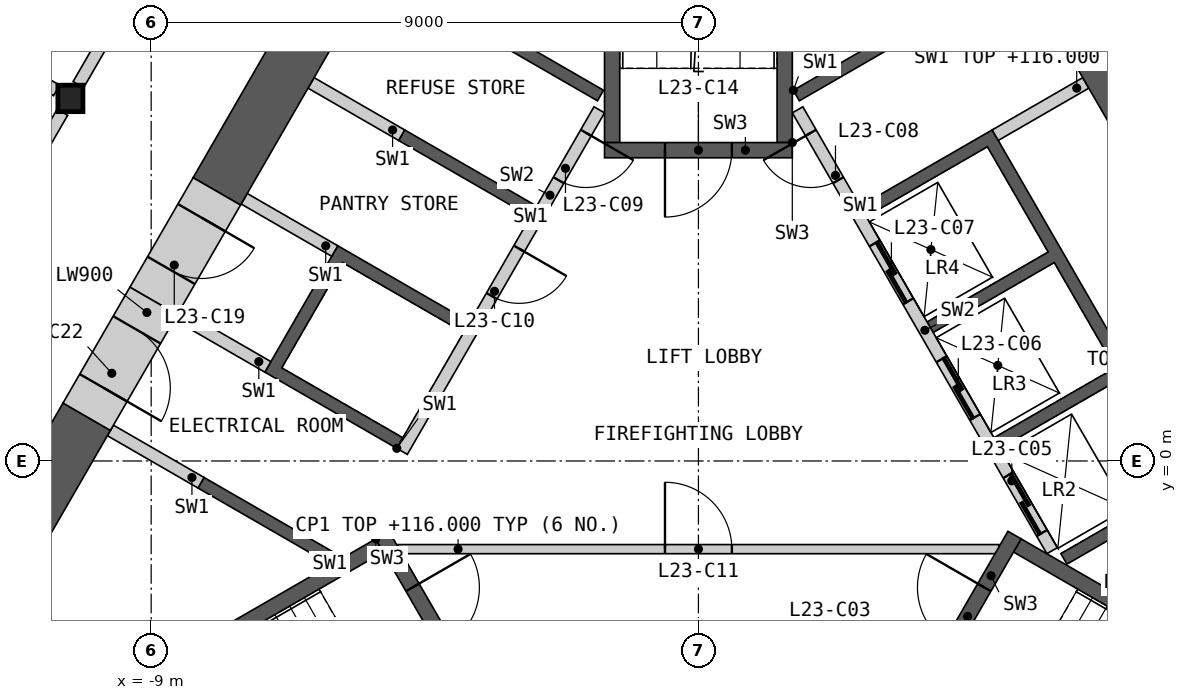
"""IFC4 building model, lengths in metres.
Left out: names, types, materials, properties, quantities, classifications, styles, units other than length and angle.
Written with IfcOpenShell. Run it as: python <this file> out.ifc"""

import sys

from ifc_helpers import new_model, si_unit, direction, frame, frame_2d, origin, origin_2d, place, context, subcontext, project, spatial, polyline, rectangle, i_section, outline, extrude, element, fill, save


model = new_model("IFC4")
c1 = context("Model", 3, precision=1e-05, world=origin(), true_north=direction((0.0, 1.0)))
c2 = subcontext(c1, "Body", "Model", "MODEL_VIEW")
j1 = project(units=[si_unit("LENGTHUNIT", "METRE"), si_unit("PLANEANGLEUNIT", "RADIAN")], contexts=[c1])
p1 = place(None, origin())
s1 = spatial("IfcSite", under=j1, at=p1, CompositionType="ELEMENT")
p2 = place(p1, origin())
s2 = spatial("IfcBuilding", under=s1, at=p2, CompositionType="ELEMENT")
p3 = place(p2, frame((0.0, 0.0, 112.2)))
s3 = spatial("IfcBuildingStorey", under=s2, at=p3, CompositionType="ELEMENT", Elevation=112.2)
p4 = place(p3, frame((-10.328, 5.963, 0.0), z_axis=(0.0, 0.0, 1.0), x_axis=(1.0, 0.0, 0.0)))
e1 = element("IfcColumn", 1, at=p4, inside=s3, PredefinedType="COLUMN", context=c2, shape_type="SweptSolid", body=[
    extrude(i_section(OverallWidth=0.412, OverallDepth=0.435, WebThickness=0.036, FlangeThickness=0.057, at=origin_2d()), origin(), (0.0, 0.0, 1.0), 4.2),
])
p5 = place(p3, origin())
e2 = element("IfcWall", 2, at=p5, inside=s3, PredefinedType="SHEAR", context=c2, shape_type="SweptSolid", body=[
    extrude(outline(polyline([(1.561, 6.097), (3.731, 7.35), (3.831, 7.177), (1.66, 5.924), (1.561, 6.097)])), origin(), (0.0, 0.0, 1.0), 3.8),
])
p6 = place(p3, origin())
e3 = element("IfcWall", 3, at=p6, inside=s3, PredefinedType="SHEAR", context=c2, shape_type="SweptSolid", body=[
    extrude(outline(polyline([(2.66, 4.192), (4.831, 5.445), (8.231, -0.444), (6.061, -1.697), (5.96, -1.524), (7.952, -0.374), (6.952, 1.358), (4.96, 0.208), (4.861, 0.381), (6.852, 1.531), (5.852, 3.263), (3.861, 2.113), (3.76, 2.287), (5.752, 3.437), (4.752, 5.169), (2.76, 4.019), (2.66, 4.192)])), origin(), (0.0, 0.0, 1.0), 3.8),
])
p7 = place(p3, frame((5.817, -1.476, 0.0), z_axis=(0.0, 0.0, 1.0), x_axis=(-0.500002616675, 0.866023893041, 0.0)))
e4 = element("IfcWall", 4, at=p7, inside=s3, PredefinedType="SOLIDWALL", context=c2, shape_type="SweptSolid", body=[
    extrude(rectangle(XDim=8.373, YDim=0.2, at=frame_2d((4.187, 0.0))), origin(), (0.0, 0.0, 1.0), 3.8),
])
p8 = place(p7, frame((0.337, 0.0, 0.0)))
e5 = element("IfcOpeningElement", 5, at=p8, cuts=e4, PredefinedType="OPENING", context=c2, shape_type="SweptSolid", body=[
    extrude(rectangle(XDim=1.1, YDim=2.1, at=frame_2d((0.55, 1.05))), frame((0.0, 0.11, 0.0), z_axis=(0.0, -1.0, 0.0), x_axis=(1.0, 0.0, 0.0)), (0.0, 0.0, 1.0), 0.22),
])
p9 = place(p7, frame((2.537, 0.0, 0.0)))
e6 = element("IfcOpeningElement", 6, at=p9, cuts=e4, PredefinedType="OPENING", context=c2, shape_type="SweptSolid", body=[
    extrude(rectangle(XDim=1.1, YDim=2.1, at=frame_2d((0.55, 1.05))), frame((0.0, 0.11, 0.0), z_axis=(0.0, -1.0, 0.0), x_axis=(1.0, 0.0, 0.0)), (0.0, 0.0, 1.0), 0.22),
])
p10 = place(p7, frame((4.737, 0.0, 0.0)))
e7 = element("IfcOpeningElement", 7, at=p10, cuts=e4, PredefinedType="OPENING", context=c2, shape_type="SweptSolid", body=[
    extrude(rectangle(XDim=1.1, YDim=2.1, at=frame_2d((0.55, 1.05))), frame((0.0, 0.11, 0.0), z_axis=(0.0, -1.0, 0.0), x_axis=(1.0, 0.0, 0.0)), (0.0, 0.0, 1.0), 0.22),
])
p11 = place(p7, frame((7.037, 0.0, 0.0)))
e8 = element("IfcOpeningElement", 8, at=p11, cuts=e4, PredefinedType="OPENING", context=c2, shape_type="SweptSolid", body=[
    extrude(rectangle(XDim=0.9, YDim=2.1, at=frame_2d((0.45, 1.05))), frame((0.0, 0.11, 0.0), z_axis=(0.0, -1.0, 0.0), x_axis=(1.0, 0.0, 0.0)), (0.0, 0.0, 1.0), 0.22),
])
p12 = place(p3, frame((4.881, 5.358, 0.0), z_axis=(0.0, 0.0, 1.0), x_axis=(0.866024871741, 0.500000921525, 0.0)))
e9 = element("IfcWall", 9, at=p12, inside=s3, PredefinedType="SHEAR", context=c2, shape_type="SweptSolid", body=[
    extrude(rectangle(XDim=1.72, YDim=0.2, at=frame_2d((0.86, 0.0))), origin(), (0.0, 0.0, 1.0), 3.8),
])
p13 = place(p3, origin())
e10 = element("IfcWall", 10, at=p13, inside=s3, PredefinedType="SHEAR", context=c2, shape_type="SweptSolid", body=[
    extrude(outline(polyline([(-6.061, -1.697), (-8.231, -0.444), (-8.131, -0.271), (-5.96, -1.524), (-6.061, -1.697)])), origin(), (0.0, 0.0, 1.0), 3.8),
])
p14 = place(p3, origin())
e11 = element("IfcWall", 11, at=p14, inside=s3, PredefinedType="SHEAR", context=c2, shape_type="SweptSolid", body=[
    extrude(outline(polyline([(-4.96, 0.208), (-7.131, 1.461), (-5.931, 3.54), (-3.76, 2.287), (-3.861, 2.113), (-5.852, 3.263), (-6.852, 1.531), (-4.861, 0.381), (-4.96, 0.208)])), origin(), (0.0, 0.0, 1.0), 3.8),
])
p15 = place(p3, origin())
e12 = element("IfcWall", 12, at=p15, inside=s3, PredefinedType="SHEAR", context=c2, shape_type="SweptSolid", body=[
    extrude(outline(polyline([(-2.76, 4.019), (-4.931, 5.272), (-4.831, 5.445), (-2.66, 4.192), (-2.76, 4.019)])), origin(), (0.0, 0.0, 1.0), 3.8),
])
p16 = place(p3, origin())
e13 = element("IfcWall", 13, at=p16, inside=s3, PredefinedType="SHEAR", context=c2, shape_type="SweptSolid", body=[
    extrude(outline(polyline([(-3.731, 7.35), (-1.561, 6.097), (-1.66, 5.924), (-3.831, 7.177), (-3.731, 7.35)])), origin(), (0.0, 0.0, 1.0), 3.8),
])
p17 = place(p3, frame((-1.631, 5.776, 0.0), z_axis=(0.0, 0.0, 1.0), x_axis=(-0.499992876559, -0.866029516466, 0.0)))
e14 = element("IfcWall", 14, at=p17, inside=s3, PredefinedType="SOLIDWALL", context=c2, shape_type="SweptSolid", body=[
    extrude(rectangle(XDim=6.486, YDim=0.2, at=frame_2d((3.243, 0.0))), origin(), (0.0, 0.0, 1.0), 3.8),
])
p18 = place(p17, frame((0.437, 0.0, 0.0)))
e15 = element("IfcOpeningElement", 15, at=p18, cuts=e14, PredefinedType="OPENING", context=c2, shape_type="SweptSolid", body=[
    extrude(rectangle(XDim=0.9, YDim=2.1, at=frame_2d((0.45, 1.05))), frame((0.0, 0.11, 0.0), z_axis=(0.0, -1.0, 0.0), x_axis=(1.0, 0.0, 0.0)), (0.0, 0.0, 1.0), 0.22),
])
p19 = place(p17, frame((2.637, 0.0, 0.0)))
e16 = element("IfcOpeningElement", 16, at=p19, cuts=e14, PredefinedType="OPENING", context=c2, shape_type="SweptSolid", body=[
    extrude(rectangle(XDim=0.9, YDim=2.1, at=frame_2d((0.45, 1.05))), frame((0.0, 0.11, 0.0), z_axis=(0.0, -1.0, 0.0), x_axis=(1.0, 0.0, 0.0)), (0.0, 0.0, 1.0), 0.22),
])
p20 = place(p3, frame((-4.881, 5.358, 0.0), z_axis=(0.0, 0.0, 1.0), x_axis=(-0.866024871741, 0.500000921525, 0.0)))
e17 = element("IfcWall", 17, at=p20, inside=s3, PredefinedType="SHEAR", context=c2, shape_type="SweptSolid", body=[
    extrude(rectangle(XDim=1.72, YDim=0.2, at=frame_2d((0.86, 0.0))), origin(), (0.0, 0.0, 1.0), 3.8),
])
p21 = place(p3, frame((-5.981, 3.453, 0.0), z_axis=(0.0, 0.0, 1.0), x_axis=(-0.866060346521, 0.499939472521, 0.0)))
e18 = element("IfcWall", 18, at=p21, inside=s3, PredefinedType="SHEAR", context=c2, shape_type="SweptSolid", body=[
    extrude(rectangle(XDim=1.72, YDim=0.2, at=frame_2d((0.86, 0.0))), origin(), (0.0, 0.0, 1.0), 3.8),
])
for number, where, z_axis, x_axis in (
    (19, (-7.081, 1.548, 0.0), (0.0, 0.0, 1.0), (-0.866, 0.5, 0.0)),
    (20, (-8.181, -0.357, 0.0), (0.0, 0.0, 1.0), (-0.866, 0.5, 0.0)),
):
    element("IfcWall", number, at=place(p3, frame(where, z_axis=z_axis, x_axis=x_axis)), inside=s3, PredefinedType="SHEAR", context=c2, shape_type="SweptSolid", body=[
        extrude(rectangle(XDim=1.72, YDim=0.2, at=frame_2d((0.86, 0.0))), origin(), (0.0, 0.0, 1.0), 3.8),
    ])
p22 = place(p3, frame((-4.941, -1.45, 0.0), z_axis=(0.0, 0.0, 1.0), x_axis=(1.0, 0.0, 0.0)))
e21 = element("IfcWall", 21, at=p22, inside=s3, PredefinedType="PARTITIONING", context=c2, shape_type="SweptSolid", body=[
    extrude(rectangle(XDim=9.882, YDim=0.15, at=frame_2d((4.941, 0.0))), origin(), (0.0, 0.0, 1.0), 3.8),
])
p23 = place(p22, frame((4.391, 0.0, 0.0)))
e22 = element("IfcOpeningElement", 22, at=p23, cuts=e21, PredefinedType="OPENING", context=c2, shape_type="SweptSolid", body=[
    extrude(rectangle(XDim=1.1, YDim=2.1, at=frame_2d((0.55, 1.05))), frame((0.0, 0.085, 0.0), z_axis=(0.0, -1.0, 0.0), x_axis=(1.0, 0.0, 0.0)), (0.0, 0.0, 1.0), 0.17),
])
p24 = place(p3, origin())
e23 = element("IfcWall", 23, at=p24, inside=s3, PredefinedType="SHEAR", context=c2, shape_type="SweptSolid", body=[
    extrude(outline(polyline([(-5.307, -1.281), (-10.374, -4.206), (-10.032, -4.298), (-5.182, -1.498), (-5.307, -1.281)])), origin(), (0.0, 0.0, 1.0), 3.8),
])
p25 = place(p3, frame((-5.199, -1.219, 0.0), z_axis=(0.0, 0.0, 1.0), x_axis=(0.499982516597, -0.866035497597, 0.0)))
e24 = element("IfcWall", 24, at=p25, inside=s3, PredefinedType="SHEAR", context=c2, shape_type="SweptSolid", body=[
    extrude(rectangle(XDim=3.088, YDim=0.25, at=frame_2d((1.544, 0.0))), origin(), (0.0, 0.0, 1.0), 3.8),
])
p26 = place(p25, frame((0.994, 0.0, 0.0)))
e25 = element("IfcOpeningElement", 25, at=p26, cuts=e24, PredefinedType="OPENING", context=c2, shape_type="SweptSolid", body=[
    extrude(rectangle(XDim=1.1, YDim=2.1, at=frame_2d((0.55, 1.05))), frame((0.0, 0.135, 0.0), z_axis=(0.0, -1.0, 0.0), x_axis=(1.0, 0.0, 0.0)), (0.0, 0.0, 1.0), 0.27),
])
p27 = place(p3, origin())
e26 = element("IfcWall", 26, at=p27, inside=s3, PredefinedType="SHEAR", context=c2, shape_type="SweptSolid", body=[
    extrude(outline(polyline([(10.032, -4.298), (10.374, -4.206), (5.307, -1.281), (5.182, -1.498), (10.032, -4.298)])), origin(), (0.0, 0.0, 1.0), 3.8),
])
p28 = place(p3, frame((3.655, -3.893, 0.0), z_axis=(0.0, 0.0, 1.0), x_axis=(0.499982516597, 0.866035497597, 0.0)))
e27 = element("IfcWall", 27, at=p28, inside=s3, PredefinedType="SHEAR", context=c2, shape_type="SweptSolid", body=[
    extrude(rectangle(XDim=3.088, YDim=0.25, at=frame_2d((1.544, 0.0))), origin(), (0.0, 0.0, 1.0), 3.8),
])
p29 = place(p28, frame((0.994, 0.0, 0.0)))
e28 = element("IfcOpeningElement", 28, at=p29, cuts=e27, PredefinedType="OPENING", context=c2, shape_type="SweptSolid", body=[
    extrude(rectangle(XDim=1.1, YDim=2.1, at=frame_2d((0.55, 1.05))), frame((0.0, 0.135, 0.0), z_axis=(0.0, -1.0, 0.0), x_axis=(1.0, 0.0, 0.0)), (0.0, 0.0, 1.0), 0.27),
])
p30 = place(p3, origin())
e29 = element("IfcWall", 29, at=p30, inside=s3, PredefinedType="SHEAR", context=c2, shape_type="SweptSolid", body=[
    extrude(outline(polyline([(1.544, 5.237), (1.544, 11.087), (1.294, 10.837), (1.294, 5.237), (1.544, 5.237)])), origin(), (0.0, 0.0, 1.0), 3.8),
])
p31 = place(p3, origin())
e30 = element("IfcWall", 30, at=p31, inside=s3, PredefinedType="SHEAR", context=c2, shape_type="SweptSolid", body=[
    extrude(outline(polyline([(-1.294, 10.837), (-1.544, 11.087), (-1.544, 5.237), (-1.294, 5.237), (-1.294, 10.837)])), origin(), (0.0, 0.0, 1.0), 3.8),
])
p32 = place(p3, frame((1.544, 5.112, 0.0), z_axis=(0.0, 0.0, 1.0), x_axis=(-1.0, 0.0, 0.0)))
e31 = element("IfcWall", 31, at=p32, inside=s3, PredefinedType="SHEAR", context=c2, shape_type="SweptSolid", body=[
    extrude(rectangle(XDim=3.088, YDim=0.25, at=frame_2d((1.544, 0.0))), origin(), (0.0, 0.0, 1.0), 3.8),
])
p33 = place(p32, frame((0.994, 0.0, 0.0)))
e32 = element("IfcOpeningElement", 32, at=p33, cuts=e31, PredefinedType="OPENING", context=c2, shape_type="SweptSolid", body=[
    extrude(rectangle(XDim=1.1, YDim=2.1, at=frame_2d((0.55, 1.05))), frame((0.0, 0.135, 0.0), z_axis=(0.0, -1.0, 0.0), x_axis=(1.0, 0.0, 0.0)), (0.0, 0.0, 1.0), 0.27),
])
p34 = place(p3, frame((7.91, 4.451, 0.0), z_axis=(0.0, 0.0, 1.0), x_axis=(-0.500005799286, 0.866022055539, 0.0)))
e33 = element("IfcWall", 33, at=p34, inside=s3, PredefinedType="SHEAR", context=c2, shape_type="SweptSolid", body=[
    extrude(rectangle(XDim=15.041, YDim=0.9, at=frame_2d((7.521, 0.0))), origin(), (0.0, 0.0, 1.0), 3.8),
])
p35 = place(p3, frame((-3.55, 12.004, 0.0), z_axis=(0.0, 0.0, 1.0), x_axis=(-0.499993245289, -0.866029303583, 0.0)))
e34 = element("IfcWall", 34, at=p35, inside=s3, PredefinedType="SHEAR", context=c2, shape_type="SweptSolid", body=[
    extrude(rectangle(XDim=8.741, YDim=0.9, at=frame_2d((4.37, 0.0))), origin(), (0.0, 0.0, 1.0), 3.8),
])
p36 = place(p3, frame((-10.06, 0.728, 0.0), z_axis=(0.0, 0.0, 1.0), x_axis=(-0.500021220092, -0.866013152012, 0.0)))
e35 = element("IfcWall", 35, at=p36, inside=s3, PredefinedType="SHEAR", context=c2, shape_type="SweptSolid", body=[
    extrude(rectangle(XDim=4.22, YDim=0.9, at=frame_2d((2.11, 0.0))), origin(), (0.0, 0.0, 1.0), 3.8),
])
p37 = place(p3, frame((-7.92, 4.434, 0.0), z_axis=(0.0, 0.0, 1.0), x_axis=(-0.499939227269, -0.866060488094, 0.0)))
e36 = element("IfcWall", 36, at=p37, inside=s3, PredefinedType="SHEAR", context=c2, shape_type="SweptSolid", body=[
    extrude(rectangle(XDim=2.08, YDim=0.9, at=frame_2d((1.04, 0.0))), origin(), (0.0, 0.0, 1.0), 3.8),
])
p38 = place(p37, frame((0.5, 0.0, 0.0)))
e37 = element("IfcOpeningElement", 37, at=p38, cuts=e36, PredefinedType="OPENING", context=c2, shape_type="SweptSolid", body=[
    extrude(rectangle(XDim=1.0, YDim=2.1, at=frame_2d((0.5, 1.05))), frame((0.0, 0.46, 0.0), z_axis=(0.0, -1.0, 0.0), x_axis=(1.0, 0.0, 0.0)), (0.0, 0.0, 1.0), 0.92),
])
p39 = place(p3, frame((-8.96, 2.633, 0.0), z_axis=(0.0, 0.0, 1.0), x_axis=(-0.50002983664, -0.866008176907, 0.0)))
e38 = element("IfcWall", 38, at=p39, inside=s3, PredefinedType="SHEAR", context=c2, shape_type="SweptSolid", body=[
    extrude(rectangle(XDim=2.2, YDim=0.9, at=frame_2d((1.1, 0.0))), origin(), (0.0, 0.0, 1.0), 3.8),
])
p40 = place(p39, frame((0.55, 0.0, 0.0)))
e39 = element("IfcOpeningElement", 39, at=p40, cuts=e38, PredefinedType="OPENING", context=c2, shape_type="SweptSolid", body=[
    extrude(rectangle(XDim=1.1, YDim=2.1, at=frame_2d((0.55, 1.05))), frame((0.0, 0.46, 0.0), z_axis=(0.0, -1.0, 0.0), x_axis=(1.0, 0.0, 0.0)), (0.0, 0.0, 1.0), 0.92),
])
p41 = place(p3, frame((-10.197, 6.19, 0.0), z_axis=(0.0, 0.0, 1.0), x_axis=(0.500012035596, 0.866018454918, 0.0)))
e40 = element("IfcWall", 40, at=p41, inside=s3, PredefinedType="PARTITIONING", context=c2, shape_type="SweptSolid", body=[
    extrude(rectangle(XDim=9.803, YDim=0.2, at=frame_2d((4.902, 0.0))), origin(), (0.0, 0.0, 1.0), 3.8),
])
p42 = place(p41, frame((1.851, 0.0, 0.0)))
e41 = element("IfcOpeningElement", 41, at=p42, cuts=e40, PredefinedType="OPENING", context=c2, shape_type="SweptSolid", body=[
    extrude(rectangle(XDim=1.0, YDim=2.1, at=frame_2d((0.5, 1.05))), frame((0.0, 0.11, 0.0), z_axis=(0.0, -1.0, 0.0), x_axis=(1.0, 0.0, 0.0)), (0.0, 0.0, 1.0), 0.22),
])
p43 = place(p3, frame((5.295, 14.68, 0.0), z_axis=(0.0, 0.0, 1.0), x_axis=(0.500012035596, -0.866018454918, 0.0)))
e42 = element("IfcWall", 42, at=p43, inside=s3, PredefinedType="PARTITIONING", context=c2, shape_type="SweptSolid", body=[
    extrude(rectangle(XDim=9.803, YDim=0.2, at=frame_2d((4.902, 0.0))), origin(), (0.0, 0.0, 1.0), 3.8),
])
p44 = place(p43, frame((4.376, 0.0, 0.0)))
e43 = element("IfcOpeningElement", 43, at=p44, cuts=e42, PredefinedType="OPENING", context=c2, shape_type="SweptSolid", body=[
    extrude(rectangle(XDim=0.95, YDim=2.1, at=frame_2d((0.475, 1.05))), frame((0.0, 0.11, 0.0), z_axis=(0.0, -1.0, 0.0), x_axis=(1.0, 0.0, 0.0)), (0.0, 0.0, 1.0), 0.22),
])
p45 = place(p3, frame((-15.402, -2.823, 0.0), z_axis=(0.0, 0.0, 1.0), x_axis=(0.500023237168, 0.866011987384, 0.0)))
e44 = element("IfcWall", 44, at=p45, inside=s3, PredefinedType="PARTITIONING", context=c2, shape_type="SweptSolid", body=[
    extrude(rectangle(XDim=9.883, YDim=0.2, at=frame_2d((4.942, 0.0))), origin(), (0.0, 0.0, 1.0), 3.8),
])
p46 = place(p45, frame((4.492, 0.0, 0.0)))
e45 = element("IfcOpeningElement", 45, at=p46, cuts=e44, PredefinedType="OPENING", context=c2, shape_type="SweptSolid", body=[
    extrude(rectangle(XDim=1.0, YDim=2.1, at=frame_2d((0.5, 1.05))), frame((0.0, 0.11, 0.0), z_axis=(0.0, -1.0, 0.0), x_axis=(1.0, 0.0, 0.0)), (0.0, 0.0, 1.0), 0.22),
])
p47 = place(p3, frame((-21.536, 12.434, 0.0), z_axis=(0.0, 0.0, 1.0), x_axis=(0.86602461759, -0.500001361726, 0.0)))
e46 = element("IfcWall", 46, at=p47, inside=s3, PredefinedType="PARTITIONING", context=c2, shape_type="SweptSolid", body=[
    extrude(rectangle(XDim=12.679, YDim=0.2, at=frame_2d((6.34, 0.0))), origin(), (0.0, 0.0, 1.0), 2.885),
])
p48 = place(p8, origin())
e47 = element("IfcDoor", 47, at=p48, inside=s3, OperationType="SLIDING_TO_LEFT", PredefinedType="DOOR", context=c2, shape_type="SweptSolid", body=[
    extrude(rectangle(XDim=1.1, YDim=2.1, at=frame_2d((0.55, 1.05))), frame((0.0, 0.025, 0.0), z_axis=(0.0, -1.0, 0.0), x_axis=(1.0, 0.0, 0.0)), (0.0, 0.0, 1.0), 0.05),
])
fill(e5, e47)
p49 = place(p9, origin())
e48 = element("IfcDoor", 48, at=p49, inside=s3, OperationType="SLIDING_TO_LEFT", PredefinedType="DOOR", context=c2, shape_type="SweptSolid", body=[
    extrude(rectangle(XDim=1.1, YDim=2.1, at=frame_2d((0.55, 1.05))), frame((0.0, 0.025, 0.0), z_axis=(0.0, -1.0, 0.0), x_axis=(1.0, 0.0, 0.0)), (0.0, 0.0, 1.0), 0.05),
])
fill(e6, e48)
p50 = place(p10, origin())
e49 = element("IfcDoor", 49, at=p50, inside=s3, OperationType="SLIDING_TO_LEFT", PredefinedType="DOOR", context=c2, shape_type="SweptSolid", body=[
    extrude(rectangle(XDim=1.1, YDim=2.1, at=frame_2d((0.55, 1.05))), frame((0.0, 0.025, 0.0), z_axis=(0.0, -1.0, 0.0), x_axis=(1.0, 0.0, 0.0)), (0.0, 0.0, 1.0), 0.05),
])
fill(e7, e49)
p51 = place(p11, origin())
e50 = element("IfcDoor", 50, at=p51, inside=s3, OperationType="SINGLE_SWING_RIGHT", PredefinedType="DOOR", context=c2, shape_type="SweptSolid", body=[
    extrude(rectangle(XDim=0.9, YDim=2.1, at=frame_2d((0.45, 1.05))), frame((0.0, 0.025, 0.0), z_axis=(0.0, -1.0, 0.0), x_axis=(1.0, 0.0, 0.0)), (0.0, 0.0, 1.0), 0.05),
])
fill(e8, e50)
p52 = place(p18, origin())
e51 = element("IfcDoor", 51, at=p52, inside=s3, OperationType="SINGLE_SWING_LEFT", PredefinedType="DOOR", context=c2, shape_type="SweptSolid", body=[
    extrude(rectangle(XDim=0.9, YDim=2.1, at=frame_2d((0.45, 1.05))), frame((0.0, 0.025, 0.0), z_axis=(0.0, -1.0, 0.0), x_axis=(1.0, 0.0, 0.0)), (0.0, 0.0, 1.0), 0.05),
])
fill(e15, e51)
p53 = place(p19, origin())
e52 = element("IfcDoor", 52, at=p53, inside=s3, OperationType="SINGLE_SWING_LEFT", PredefinedType="DOOR", context=c2, shape_type="SweptSolid", body=[
    extrude(rectangle(XDim=0.9, YDim=2.1, at=frame_2d((0.45, 1.05))), frame((0.0, 0.025, 0.0), z_axis=(0.0, -1.0, 0.0), x_axis=(1.0, 0.0, 0.0)), (0.0, 0.0, 1.0), 0.05),
])
fill(e16, e52)
p54 = place(p23, origin())
e53 = element("IfcDoor", 53, at=p54, inside=s3, OperationType="SINGLE_SWING_LEFT", PredefinedType="DOOR", context=c2, shape_type="SweptSolid", body=[
    extrude(rectangle(XDim=1.1, YDim=2.1, at=frame_2d((0.55, 1.05))), frame((0.0, 0.025, 0.0), z_axis=(0.0, -1.0, 0.0), x_axis=(1.0, 0.0, 0.0)), (0.0, 0.0, 1.0), 0.05),
])
fill(e22, e53)
p55 = place(p26, origin())
e54 = element("IfcDoor", 54, at=p55, inside=s3, OperationType="SINGLE_SWING_LEFT", PredefinedType="DOOR", context=c2, shape_type="SweptSolid", body=[
    extrude(rectangle(XDim=1.1, YDim=2.1, at=frame_2d((0.55, 1.05))), frame((0.0, 0.025, 0.0), z_axis=(0.0, -1.0, 0.0), x_axis=(1.0, 0.0, 0.0)), (0.0, 0.0, 1.0), 0.05),
])
fill(e25, e54)
p56 = place(p29, origin())
e55 = element("IfcDoor", 55, at=p56, inside=s3, OperationType="SINGLE_SWING_RIGHT", PredefinedType="DOOR", context=c2, shape_type="SweptSolid", body=[
    extrude(rectangle(XDim=1.1, YDim=2.1, at=frame_2d((0.55, 1.05))), frame((0.0, 0.025, 0.0), z_axis=(0.0, -1.0, 0.0), x_axis=(1.0, 0.0, 0.0)), (0.0, 0.0, 1.0), 0.05),
])
fill(e28, e55)
p57 = place(p33, origin())
e56 = element("IfcDoor", 56, at=p57, inside=s3, OperationType="SINGLE_SWING_RIGHT", PredefinedType="DOOR", context=c2, shape_type="SweptSolid", body=[
    extrude(rectangle(XDim=1.1, YDim=2.1, at=frame_2d((0.55, 1.05))), frame((0.0, 0.025, 0.0), z_axis=(0.0, -1.0, 0.0), x_axis=(1.0, 0.0, 0.0)), (0.0, 0.0, 1.0), 0.05),
])
fill(e32, e56)
p58 = place(p38, origin())
e57 = element("IfcDoor", 57, at=p58, inside=s3, OperationType="SINGLE_SWING_LEFT", PredefinedType="DOOR", context=c2, shape_type="SweptSolid", body=[
    extrude(rectangle(XDim=1.0, YDim=2.1, at=frame_2d((0.5, 1.05))), frame((0.0, 0.205, 0.0), z_axis=(0.0, -1.0, 0.0), x_axis=(1.0, 0.0, 0.0)), (0.0, 0.0, 1.0), 0.05),
])
fill(e37, e57)
p59 = place(p40, origin())
e58 = element("IfcDoor", 58, at=p59, inside=s3, OperationType="SINGLE_SWING_RIGHT", PredefinedType="DOOR", context=c2, shape_type="SweptSolid", body=[
    extrude(rectangle(XDim=1.1, YDim=2.1, at=frame_2d((0.55, 1.05))), frame((0.0, 0.205, 0.0), z_axis=(0.0, -1.0, 0.0), x_axis=(1.0, 0.0, 0.0)), (0.0, 0.0, 1.0), 0.05),
])
fill(e39, e58)
save(model, sys.argv[1])
